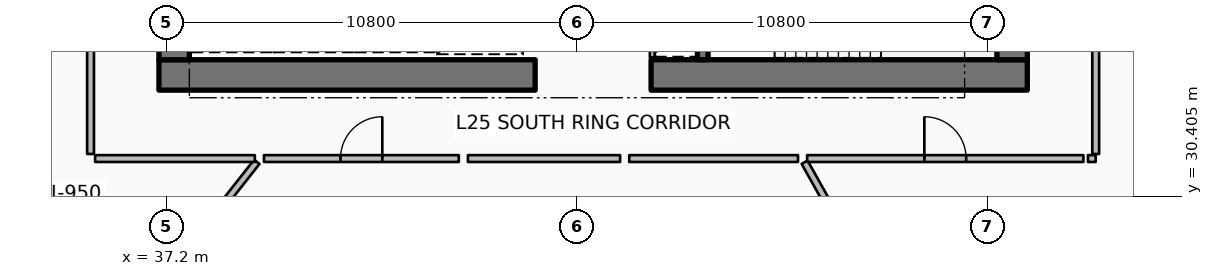
"""IFC4 building model, lengths in metres.
Left out: names, types, materials, properties, quantities, classifications, styles, units other than length and angle.
Written with IfcOpenShell. Run it as: python <this file> out.ifc"""

import sys

from ifc_helpers import new_model, si_unit, direction, frame, frame_2d, origin, place, context, subcontext, project, spatial, rectangle, extrude, element, fill, save


model = new_model("IFC4")
c1 = context("Model", 3, precision=1e-05, world=origin(), true_north=direction((0.0, 1.0)))
c2 = subcontext(c1, "Body", "Model", "MODEL_VIEW")
j1 = project(units=[si_unit("LENGTHUNIT", "METRE"), si_unit("PLANEANGLEUNIT", "RADIAN")], contexts=[c1])
p1 = place(None, origin())
s1 = spatial("IfcSite", under=j1, at=p1, CompositionType="ELEMENT")
p2 = place(p1, origin())
s2 = spatial("IfcBuilding", under=s1, at=p2, CompositionType="ELEMENT")
p3 = place(p2, frame((0.0, 0.0, 101.4)))
s3 = spatial("IfcBuildingStorey", under=s2, at=p3, CompositionType="ELEMENT", Elevation=101.4)
p4 = place(p3, frame((37.0, 33.6, 0.0), z_axis=(0.0, 0.0, 1.0), x_axis=(1.0, 0.0, 0.0)))
e1 = element("IfcWall", 1, at=p4, inside=s3, PredefinedType="SHEAR", context=c2, shape_type="SweptSolid", body=[
    extrude(rectangle(XDim=9.9, YDim=0.8, at=frame_2d((4.95, 0.0))), origin(), (0.0, 0.0, 1.0), 3.75),
])
p5 = place(p3, frame((49.95, 33.6, 0.0), z_axis=(0.0, 0.0, 1.0), x_axis=(1.0, 0.0, 0.0)))
e2 = element("IfcWall", 2, at=p5, inside=s3, PredefinedType="SHEAR", context=c2, shape_type="SweptSolid", body=[
    extrude(rectangle(XDim=9.9, YDim=0.8, at=frame_2d((4.95, 0.0))), origin(), (0.0, 0.0, 1.0), 3.75),
])
for number, where, z_axis, x_axis in (
    (3, (37.4, 34.0, 0.0), (0.0, 0.0, 1.0), (0.0, 1.0, 0.0)),
    (4, (59.45, 34.0, 0.0), (0.0, 0.0, 1.0), (0.0, 1.0, 0.0)),
):
    element("IfcWall", number, at=place(p3, frame(where, z_axis=z_axis, x_axis=x_axis)), inside=s3, PredefinedType="SHEAR", context=c2, shape_type="SweptSolid", body=[
        extrude(rectangle(XDim=16.0, YDim=0.8, at=frame_2d((8.0, 0.0))), origin(), (0.0, 0.0, 1.0), 3.75),
    ])
p6 = place(p3, frame((51.31, 34.0, 0.0), z_axis=(0.0, 0.0, 1.0), x_axis=(0.0, 1.0, 0.0)))
e5 = element("IfcWall", 5, at=p6, inside=s3, PredefinedType="SHEAR", context=c2, shape_type="SweptSolid", body=[
    extrude(rectangle(XDim=3.5, YDim=0.28, at=frame_2d((1.75, 0.0))), origin(), (0.0, 0.0, 1.0), 3.75),
])
p7 = place(p3, frame((49.98, 34.06, 0.0), z_axis=(0.0, 0.0, 1.0), x_axis=(0.0, 1.0, 0.0)))
e6 = element("IfcWall", 6, at=p7, inside=s3, PredefinedType="PARTITIONING", context=c2, shape_type="SweptSolid", body=[
    extrude(rectangle(XDim=3.4, YDim=0.125, at=frame_2d((1.7, 0.0))), origin(), (0.0, 0.0, 1.0), 2.94),
])
p8 = place(p3, frame((39.575, 31.314, 0.0), z_axis=(0.0, 0.0, 1.0), x_axis=(-0.619083417853, -0.785325233098, 0.0)))
e7 = element("IfcWall", 7, at=p8, inside=s3, PredefinedType="PARTITIONING", context=c2, shape_type="SweptSolid", body=[
    extrude(rectangle(XDim=15.063, YDim=0.18, at=frame_2d((7.532, 0.0))), origin(), (0.0, 0.0, 1.0), 2.94),
])
p9 = place(p3, frame((53.99, 31.304, 0.0), z_axis=(0.0, 0.0, 1.0), x_axis=(0.488628442553, -0.872491974249, 0.0)))
e8 = element("IfcWall", 8, at=p9, inside=s3, PredefinedType="PARTITIONING", context=c2, shape_type="SweptSolid", body=[
    extrude(rectangle(XDim=11.563, YDim=0.18, at=frame_2d((5.782, 0.0))), origin(), (0.0, 0.0, 1.0), 2.94),
])
p10 = place(p3, frame((35.2, 34.712, 0.0), z_axis=(0.0, 0.0, 1.0), x_axis=(0.0, -1.0, 0.0)))
e9 = element("IfcWall", 9, at=p10, inside=s3, PredefinedType="PARTITIONING", context=c2, shape_type="SweptSolid", body=[
    extrude(rectangle(XDim=3.192, YDim=0.18, at=frame_2d((1.596, 0.0))), origin(), (0.0, 0.0, 1.0), 2.94),
])
p11 = place(p3, frame((35.32, 31.4, 0.0), z_axis=(0.0, 0.0, 1.0), x_axis=(1.0, 0.0, 0.0)))
e10 = element("IfcWall", 10, at=p11, inside=s3, PredefinedType="PARTITIONING", context=c2, shape_type="SweptSolid", body=[
    extrude(rectangle(XDim=4.204, YDim=0.18, at=frame_2d((2.102, 0.0))), origin(), (0.0, 0.0, 1.0), 2.94),
])
p12 = place(p3, frame((33.053, 30.418, 0.0), z_axis=(0.0, 0.0, 1.0), x_axis=(0.702647387595, -0.711538227157, 0.0)))
e11 = element("IfcWall", 11, at=p12, inside=s3, PredefinedType="PARTITIONING", context=c2, shape_type="SweptSolid", body=[
    extrude(rectangle(XDim=4.503, YDim=0.125, at=frame_2d((2.252, 0.0))), origin(), (0.0, 0.0, 1.0), 2.94),
])
p13 = place(p12, frame((1.802, 0.0, 0.0)))
e12 = element("IfcOpeningElement", 12, at=p13, cuts=e11, PredefinedType="OPENING", context=c2, shape_type="SweptSolid", body=[
    extrude(rectangle(XDim=0.9, YDim=2.08, at=frame_2d((0.45, 1.04))), frame((0.0, 0.073, 0.0), z_axis=(0.0, -1.0, 0.0), x_axis=(1.0, 0.0, 0.0)), (0.0, 0.0, 1.0), 0.145),
])
p14 = place(p3, frame((39.764, 31.4, 0.0), z_axis=(0.0, 0.0, 1.0), x_axis=(1.0, 0.0, 0.0)))
e13 = element("IfcWall", 13, at=p14, inside=s3, PredefinedType="PARTITIONING", context=c2, shape_type="SweptSolid", body=[
    extrude(rectangle(XDim=5.127, YDim=0.18, at=frame_2d((2.563, 0.0))), origin(), (0.0, 0.0, 1.0), 2.94),
])
p15 = place(p14, frame((2.013, 0.0, 0.0)))
e14 = element("IfcOpeningElement", 14, at=p15, cuts=e13, PredefinedType="OPENING", context=c2, shape_type="SweptSolid", body=[
    extrude(rectangle(XDim=1.1, YDim=2.1, at=frame_2d((0.55, 1.05))), frame((0.0, 0.1, 0.0), z_axis=(0.0, -1.0, 0.0), x_axis=(1.0, 0.0, 0.0)), (0.0, 0.0, 1.0), 0.2),
])
p16 = place(p3, frame((45.131, 31.4, 0.0), z_axis=(0.0, 0.0, 1.0), x_axis=(1.0, 0.0, 0.0)))
e15 = element("IfcWall", 15, at=p16, inside=s3, PredefinedType="PARTITIONING", context=c2, shape_type="SweptSolid", body=[
    extrude(rectangle(XDim=4.004, YDim=0.18, at=frame_2d((2.002, 0.0))), origin(), (0.0, 0.0, 1.0), 2.94),
])
p17 = place(p3, frame((49.375, 31.4, 0.0), z_axis=(0.0, 0.0, 1.0), x_axis=(1.0, 0.0, 0.0)))
e16 = element("IfcWall", 16, at=p17, inside=s3, PredefinedType="PARTITIONING", context=c2, shape_type="SweptSolid", body=[
    extrude(rectangle(XDim=4.442, YDim=0.18, at=frame_2d((2.221, 0.0))), origin(), (0.0, 0.0, 1.0), 2.94),
])
p18 = place(p3, frame((54.056, 31.4, 0.0), z_axis=(0.0, 0.0, 1.0), x_axis=(1.0, 0.0, 0.0)))
e17 = element("IfcWall", 17, at=p18, inside=s3, PredefinedType="PARTITIONING", context=c2, shape_type="SweptSolid", body=[
    extrude(rectangle(XDim=7.27, YDim=0.18, at=frame_2d((3.635, 0.0))), origin(), (0.0, 0.0, 1.0), 2.94),
])
p19 = place(p18, frame((3.085, 0.0, 0.0)))
e18 = element("IfcOpeningElement", 18, at=p19, cuts=e17, PredefinedType="OPENING", context=c2, shape_type="SweptSolid", body=[
    extrude(rectangle(XDim=1.1, YDim=2.1, at=frame_2d((0.55, 1.05))), frame((0.0, 0.1, 0.0), z_axis=(0.0, -1.0, 0.0), x_axis=(1.0, 0.0, 0.0)), (0.0, 0.0, 1.0), 0.2),
])
p20 = place(p3, frame((61.446, 31.4, 0.0), z_axis=(0.0, 0.0, 1.0), x_axis=(1.0, 0.0, 0.0)))
e19 = element("IfcWall", 19, at=p20, inside=s3, PredefinedType="PARTITIONING", context=c2, shape_type="SweptSolid", body=[
    extrude(rectangle(XDim=0.204, YDim=0.18, at=frame_2d((0.102, 0.0))), origin(), (0.0, 0.0, 1.0), 2.94),
])
p21 = place(p3, frame((61.65, 31.52, 0.0), z_axis=(0.0, 0.0, 1.0), x_axis=(0.0, 1.0, 0.0)))
e20 = element("IfcWall", 20, at=p21, inside=s3, PredefinedType="PARTITIONING", context=c2, shape_type="SweptSolid", body=[
    extrude(rectangle(XDim=6.51, YDim=0.18, at=frame_2d((3.255, 0.0))), origin(), (0.0, 0.0, 1.0), 2.94),
])
p22 = place(p15, origin())
e21 = element("IfcDoor", 21, at=p22, inside=s3, OperationType="SINGLE_SWING_RIGHT", PredefinedType="DOOR", context=c2, shape_type="SweptSolid", body=[
    extrude(rectangle(XDim=1.1, YDim=2.1, at=frame_2d((0.55, 1.05))), frame((0.0, 0.025, 0.0), z_axis=(0.0, -1.0, 0.0), x_axis=(1.0, 0.0, 0.0)), (0.0, 0.0, 1.0), 0.05),
])
fill(e14, e21)
p23 = place(p19, origin())
e22 = element("IfcDoor", 22, at=p23, inside=s3, OperationType="SINGLE_SWING_LEFT", PredefinedType="DOOR", context=c2, shape_type="SweptSolid", body=[
    extrude(rectangle(XDim=1.1, YDim=2.1, at=frame_2d((0.55, 1.05))), frame((0.0, 0.025, 0.0), z_axis=(0.0, -1.0, 0.0), x_axis=(1.0, 0.0, 0.0)), (0.0, 0.0, 1.0), 0.05),
])
fill(e18, e22)
save(model, sys.argv[1])
